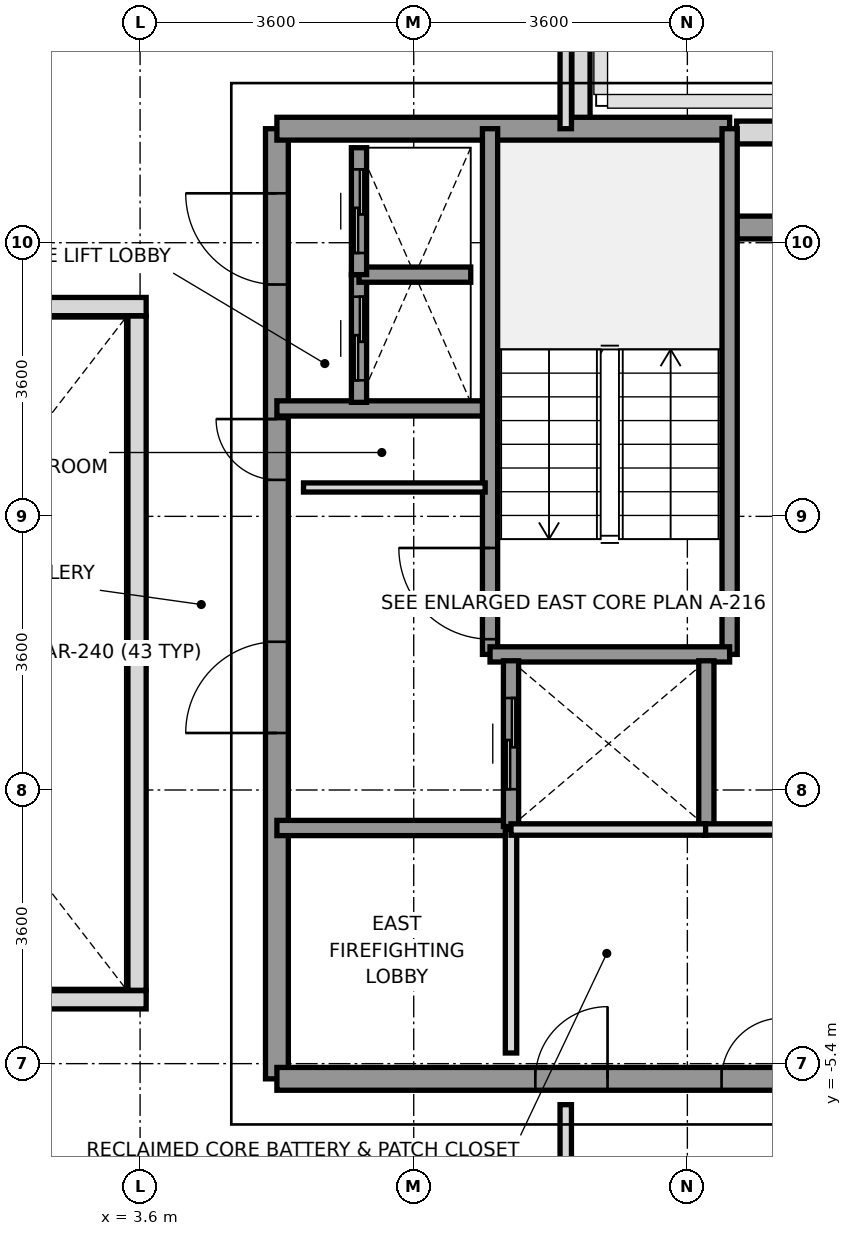
"""IFC4 building model, lengths in metres.
Left out: names, types, materials, properties, quantities, classifications, styles, units other than length and angle.
Written with IfcOpenShell. Run it as: python <this file> out.ifc"""

import sys

from ifc_helpers import new_model, si_unit, direction, frame, frame_2d, origin, place, context, subcontext, project, spatial, rectangle, extrude, source, transform, mapped, element, fill, save


model = new_model("IFC4")
c1 = context("Model", 3, precision=1e-05, world=origin(), true_north=direction((0.0, 1.0)))
c2 = subcontext(c1, "Body", "Model", "MODEL_VIEW")
j1 = project(units=[si_unit("LENGTHUNIT", "METRE"), si_unit("PLANEANGLEUNIT", "RADIAN")], contexts=[c1])
p1 = place(None, origin())
s1 = spatial("IfcSite", under=j1, at=p1, CompositionType="ELEMENT")
p2 = place(p1, origin())
s2 = spatial("IfcBuilding", under=s1, at=p2, CompositionType="ELEMENT")
p3 = place(p2, frame((0.0, 0.0, 233.2)))
s3 = spatial("IfcBuildingStorey", under=s2, at=p3, CompositionType="ELEMENT", Elevation=233.2)
p4 = place(p3, frame((11.448, 6.85, 0.0), z_axis=(0.0, 0.0, 1.0), x_axis=(1.0, 0.0, 0.0)))
e1 = element("IfcWall", 1, at=p4, inside=s3, PredefinedType="SOLIDWALL", context=c2, shape_type="SweptSolid", body=[
    extrude(rectangle(XDim=2.685, YDim=0.3, at=frame_2d((1.343, 0.0))), origin(), (0.0, 0.0, 1.0), 2.57),
])
p5 = place(p3, frame((9.4, 8.622, 0.0), z_axis=(0.0, 0.0, 1.0), x_axis=(0.0, -1.0, 0.0)))
e2 = element("IfcWall", 2, at=p5, inside=s3, PredefinedType="PARAPET", context=c2, shape_type="SweptSolid", body=[
    extrude(rectangle(XDim=1.669, YDim=0.24, at=frame_2d((0.834, 0.0))), origin(), (0.0, 0.0, 1.0), 1.15),
])
p6 = place(p3, frame((5.4, -5.6, 0.0), z_axis=(0.0, 0.0, 1.0), x_axis=(0.0, 1.0, 0.0)))
e3 = element("IfcWall", 3, at=p6, inside=s3, PredefinedType="SHEAR", context=c2, shape_type="SweptSolid", body=[
    extrude(rectangle(XDim=12.5, YDim=0.3, at=frame_2d((6.25, 0.0))), origin(), (0.0, 0.0, 1.0), 3.01),
])
p7 = place(p6, frame((4.55, 0.0, 0.0)))
e4 = element("IfcOpeningElement", 4, at=p7, cuts=e3, PredefinedType="OPENING", context=c2, shape_type="SweptSolid", body=[
    extrude(rectangle(XDim=1.2, YDim=2.2, at=frame_2d((0.6, 1.1))), frame((0.0, 0.16, 0.0), z_axis=(0.0, -1.0, 0.0), x_axis=(1.0, 0.0, 0.0)), (0.0, 0.0, 1.0), 0.32),
])
p8 = place(p6, frame((10.45, 0.0, 0.0)))
e5 = element("IfcOpeningElement", 5, at=p8, cuts=e3, PredefinedType="OPENING", context=c2, shape_type="SweptSolid", body=[
    extrude(rectangle(XDim=1.2, YDim=2.2, at=frame_2d((0.6, 1.1))), frame((0.0, 0.16, 0.0), z_axis=(0.0, -1.0, 0.0), x_axis=(1.0, 0.0, 0.0)), (0.0, 0.0, 1.0), 0.32),
])
p9 = place(p6, frame((7.88, 0.0, 0.0)))
e6 = element("IfcOpeningElement", 6, at=p9, cuts=e3, PredefinedType="OPENING", context=c2, shape_type="SweptSolid", body=[
    extrude(rectangle(XDim=0.8, YDim=2.1, at=frame_2d((0.4, 1.05))), frame((0.0, 0.16, 0.0), z_axis=(0.0, -1.0, 0.0), x_axis=(1.0, 0.0, 0.0)), (0.0, 0.0, 1.0), 0.32),
])
p10 = place(p3, frame((5.4, 6.9, 0.0), z_axis=(0.0, 0.0, 1.0), x_axis=(1.0, 0.0, 0.0)))
e7 = element("IfcWall", 7, at=p10, inside=s3, PredefinedType="SHEAR", context=c2, shape_type="SweptSolid", body=[
    extrude(rectangle(XDim=5.956, YDim=0.3, at=frame_2d((2.978, 0.0))), origin(), (0.0, 0.0, 1.0), 3.01),
])
p11 = place(p3, frame((11.356, 5.6, 0.0), z_axis=(0.0, 0.0, 1.0), x_axis=(1.0, 0.0, 0.0)))
e8 = element("IfcWall", 8, at=p11, inside=s3, PredefinedType="SHEAR", context=c2, shape_type="SweptSolid", body=[
    extrude(rectangle(XDim=1.844, YDim=0.3, at=frame_2d((0.922, 0.0))), origin(), (0.0, 0.0, 1.0), 3.01),
])
p12 = place(p3, frame((5.4, -5.6, 0.0), z_axis=(0.0, 0.0, 1.0), x_axis=(1.0, 0.0, 0.0)))
e9 = element("IfcWall", 9, at=p12, inside=s3, PredefinedType="SHEAR", context=c2, shape_type="SweptSolid", body=[
    extrude(rectangle(XDim=7.8, YDim=0.3, at=frame_2d((3.9, 0.0))), origin(), (0.0, 0.0, 1.0), 3.01),
])
p13 = place(p12, frame((5.85, 0.0, 0.0)))
e10 = element("IfcOpeningElement", 10, at=p13, cuts=e9, PredefinedType="OPENING", context=c2, shape_type="SweptSolid", body=[
    extrude(rectangle(XDim=0.8, YDim=2.1, at=frame_2d((0.4, 1.05))), frame((0.0, 0.16, 0.0), z_axis=(0.0, -1.0, 0.0), x_axis=(1.0, 0.0, 0.0)), (0.0, 0.0, 1.0), 0.32),
])
p14 = place(p12, frame((3.4, 0.0, 0.0)))
e11 = element("IfcOpeningElement", 11, at=p14, cuts=e9, PredefinedType="OPENING", context=c2, shape_type="SweptSolid", body=[
    extrude(rectangle(XDim=0.95, YDim=2.15, at=frame_2d((0.475, 1.075))), frame((0.0, 0.16, 0.0), z_axis=(0.0, -1.0, 0.0), x_axis=(1.0, 0.0, 0.0)), (0.0, 0.0, 1.0), 0.32),
])
p15 = place(p3, frame((5.4, 3.22, 0.0), z_axis=(0.0, 0.0, 1.0), x_axis=(1.0, 0.0, 0.0)))
e12 = element("IfcWall", 12, at=p15, inside=s3, PredefinedType="SOLIDWALL", context=c2, shape_type="SweptSolid", body=[
    extrude(rectangle(XDim=2.78, YDim=0.2, at=frame_2d((1.39, 0.0))), origin(), (0.0, 0.0, 1.0), 3.01),
])
p16 = place(p3, frame((5.4, -2.3, 0.0), z_axis=(0.0, 0.0, 1.0), x_axis=(1.0, 0.0, 0.0)))
e13 = element("IfcWall", 13, at=p16, inside=s3, PredefinedType="SOLIDWALL", context=c2, shape_type="SweptSolid", body=[
    extrude(rectangle(XDim=3.08, YDim=0.2, at=frame_2d((1.54, 0.0))), origin(), (0.0, 0.0, 1.0), 3.01),
])
p17 = place(p3, frame((8.204, -0.016, 0.0), z_axis=(0.0, 0.0, 1.0), x_axis=(0.0, 1.0, 0.0)))
e14 = element("IfcWall", 14, at=p17, inside=s3, PredefinedType="SOLIDWALL", context=c2, shape_type="SweptSolid", body=[
    extrude(rectangle(XDim=6.916, YDim=0.2, at=frame_2d((3.458, 0.0))), origin(), (0.0, 0.0, 1.0), 3.01),
])
p18 = place(p17, frame((0.2, 0.0, 0.0)))
e15 = element("IfcOpeningElement", 15, at=p18, cuts=e14, PredefinedType="OPENING", context=c2, shape_type="SweptSolid", body=[
    extrude(rectangle(XDim=1.2, YDim=2.2, at=frame_2d((0.6, 1.1))), frame((0.0, 0.11, 0.0), z_axis=(0.0, -1.0, 0.0), x_axis=(1.0, 0.0, 0.0)), (0.0, 0.0, 1.0), 0.22),
])
p19 = place(p3, frame((11.356, -0.016, 0.0), z_axis=(0.0, 0.0, 1.0), x_axis=(0.0, 1.0, 0.0)))
e16 = element("IfcWall", 16, at=p19, inside=s3, PredefinedType="SOLIDWALL", context=c2, shape_type="SweptSolid", body=[
    extrude(rectangle(XDim=6.916, YDim=0.2, at=frame_2d((3.458, 0.0))), origin(), (0.0, 0.0, 1.0), 3.01),
])
p20 = place(p3, frame((8.204, -0.016, 0.0), z_axis=(0.0, 0.0, 1.0), x_axis=(1.0, 0.0, 0.0)))
e17 = element("IfcWall", 17, at=p20, inside=s3, PredefinedType="SOLIDWALL", context=c2, shape_type="SweptSolid", body=[
    extrude(rectangle(XDim=3.152, YDim=0.2, at=frame_2d((1.576, 0.0))), origin(), (0.0, 0.0, 1.0), 3.01),
])
p21 = place(p3, frame((8.48, -2.28, 0.0), z_axis=(0.0, 0.0, 1.0), x_axis=(0.0, 1.0, 0.0)))
e18 = element("IfcWall", 18, at=p21, inside=s3, PredefinedType="SOLIDWALL", context=c2, shape_type="SweptSolid", body=[
    extrude(rectangle(XDim=2.18, YDim=0.2, at=frame_2d((1.09, 0.0))), origin(), (0.0, 0.0, 1.0), 3.01),
])
p22 = place(p21, frame((0.49, 0.0, 0.0)))
e19 = element("IfcOpeningElement", 19, at=p22, cuts=e18, PredefinedType="OPENING", context=c2, shape_type="SweptSolid", body=[
    extrude(rectangle(XDim=1.2, YDim=2.2, at=frame_2d((0.6, 1.1))), frame((0.0, 0.11, 0.0), z_axis=(0.0, -1.0, 0.0), x_axis=(1.0, 0.0, 0.0)), (0.0, 0.0, 1.0), 0.22),
])
p23 = place(p3, frame((11.05, -2.28, 0.0), z_axis=(0.0, 0.0, 1.0), x_axis=(0.0, 1.0, 0.0)))
e20 = element("IfcWall", 20, at=p23, inside=s3, PredefinedType="SOLIDWALL", context=c2, shape_type="SweptSolid", body=[
    extrude(rectangle(XDim=2.18, YDim=0.2, at=frame_2d((1.09, 0.0))), origin(), (0.0, 0.0, 1.0), 3.01),
])
p24 = place(p3, frame((6.48, 3.3, 0.0), z_axis=(0.0, 0.0, 1.0), x_axis=(0.0, 1.0, 0.0)))
e21 = element("IfcWall", 21, at=p24, inside=s3, PredefinedType="SOLIDWALL", context=c2, shape_type="SweptSolid", body=[
    extrude(rectangle(XDim=1.68, YDim=0.2, at=frame_2d((0.84, 0.0))), origin(), (0.0, 0.0, 1.0), 3.01),
])
p25 = place(p24, frame((0.29, 0.0, 0.0)))
e22 = element("IfcOpeningElement", 22, at=p25, cuts=e21, PredefinedType="OPENING", context=c2, shape_type="SweptSolid", body=[
    extrude(rectangle(XDim=1.1, YDim=2.2, at=frame_2d((0.55, 1.1))), frame((0.0, 0.11, 0.0), z_axis=(0.0, -1.0, 0.0), x_axis=(1.0, 0.0, 0.0)), (0.0, 0.0, 1.0), 0.22),
])
p26 = place(p3, frame((6.48, 4.98, 0.0), z_axis=(0.0, 0.0, 1.0), x_axis=(1.0, 0.0, 0.0)))
e23 = element("IfcWall", 23, at=p26, inside=s3, PredefinedType="SOLIDWALL", context=c2, shape_type="SweptSolid", body=[
    extrude(rectangle(XDim=1.47, YDim=0.2, at=frame_2d((0.735, 0.0))), origin(), (0.0, 0.0, 1.0), 3.01),
])
p27 = place(p3, frame((6.48, 4.98, 0.0), z_axis=(0.0, 0.0, 1.0), x_axis=(0.0, 1.0, 0.0)))
e24 = element("IfcWall", 24, at=p27, inside=s3, PredefinedType="SOLIDWALL", context=c2, shape_type="SweptSolid", body=[
    extrude(rectangle(XDim=1.67, YDim=0.2, at=frame_2d((0.835, 0.0))), origin(), (0.0, 0.0, 1.0), 3.01),
])
p28 = place(p27, frame((0.285, 0.0, 0.0)))
e25 = element("IfcOpeningElement", 25, at=p28, cuts=e24, PredefinedType="OPENING", context=c2, shape_type="SweptSolid", body=[
    extrude(rectangle(XDim=1.1, YDim=2.2, at=frame_2d((0.55, 1.1))), frame((0.0, 0.11, 0.0), z_axis=(0.0, -1.0, 0.0), x_axis=(1.0, 0.0, 0.0)), (0.0, 0.0, 1.0), 0.22),
])
p29 = place(p3, frame((5.75, 2.18, 0.0), z_axis=(0.0, 0.0, 1.0), x_axis=(1.0, 0.0, 0.0)))
e26 = element("IfcWall", 26, at=p29, inside=s3, PredefinedType="PARTITIONING", context=c2, shape_type="SweptSolid", body=[
    extrude(rectangle(XDim=2.39, YDim=0.12, at=frame_2d((1.195, 0.0))), origin(), (0.0, 0.0, 1.0), 3.01),
])
p30 = place(p3, frame((11.02, -2.32, 0.0), z_axis=(0.0, 0.0, 1.0), x_axis=(1.0, 0.0, 0.0)))
e27 = element("IfcWall", 27, at=p30, inside=s3, PredefinedType="PARTITIONING", context=c2, shape_type="SweptSolid", body=[
    extrude(rectangle(XDim=2.18, YDim=0.15, at=frame_2d((1.09, 0.0))), origin(), (0.0, 0.0, 1.0), 3.01),
])
p31 = place(p3, frame((8.48, -5.26, 0.0), z_axis=(0.0, 0.0, 1.0), x_axis=(0.0, 1.0, 0.0)))
e28 = element("IfcWall", 28, at=p31, inside=s3, PredefinedType="PARTITIONING", context=c2, shape_type="SweptSolid", body=[
    extrude(rectangle(XDim=2.94, YDim=0.15, at=frame_2d((1.47, 0.0))), origin(), (0.0, 0.0, 1.0), 3.01),
])
p32 = place(p3, frame((8.48, -2.32, 0.0), z_axis=(0.0, 0.0, 1.0), x_axis=(1.0, 0.0, 0.0)))
e29 = element("IfcWall", 29, at=p32, inside=s3, PredefinedType="PARTITIONING", context=c2, shape_type="SweptSolid", body=[
    extrude(rectangle(XDim=2.56, YDim=0.15, at=frame_2d((1.28, 0.0))), origin(), (0.0, 0.0, 1.0), 3.01),
])
p33 = place(p3, frame((9.2, 6.9, 0.0), z_axis=(0.0, 0.0, 1.0), x_axis=(0.0, 1.0, 0.0)))
e30 = element("IfcWall", 30, at=p33, inside=s3, PredefinedType="PARTITIONING", context=c2, shape_type="SweptSolid", body=[
    extrude(rectangle(XDim=3.38, YDim=0.15, at=frame_2d((1.69, 0.0))), origin(), (0.0, 0.0, 1.0), 2.61),
])
p34 = place(p3, frame((9.2, -10.28, 0.0), z_axis=(0.0, 0.0, 1.0), x_axis=(0.0, 1.0, 0.0)))
e31 = element("IfcWall", 31, at=p34, inside=s3, PredefinedType="PARTITIONING", context=c2, shape_type="SweptSolid", body=[
    extrude(rectangle(XDim=4.34, YDim=0.15, at=frame_2d((2.17, 0.0))), origin(), (0.0, 0.0, 1.0), 2.61),
])
for number, where, z_axis, x_axis in (
    (32, (-3.68, -4.56, 0.0), (0.0, 0.0, 1.0), (1.0, 0.0, 0.0)),
    (33, (-3.68, 4.56, 0.0), (0.0, 0.0, 1.0), (1.0, 0.0, 0.0)),
):
    element("IfcWall", number, at=place(p3, frame(where, z_axis=z_axis, x_axis=x_axis)), inside=s3, PredefinedType="PARAPET", context=c2, shape_type="SweptSolid", body=[
        extrude(rectangle(XDim=7.36, YDim=0.24, at=frame_2d((3.68, 0.0))), origin(), (0.0, 0.0, 1.0), 1.15),
    ])
p35 = place(p3, frame((3.56, -4.435, 0.0), z_axis=(0.0, 0.0, 1.0), x_axis=(0.0, 1.0, 0.0)))
e34 = element("IfcWall", 34, at=p35, inside=s3, PredefinedType="PARAPET", context=c2, shape_type="SweptSolid", body=[
    extrude(rectangle(XDim=8.87, YDim=0.24, at=frame_2d((4.435, 0.0))), origin(), (0.0, 0.0, 1.0), 1.15),
])
m1 = source(origin(), c2, "Body", "SweptSolid", [
    extrude(rectangle(XDim=1.2, YDim=2.2, at=frame_2d((0.6, 1.1))), frame((0.0, 0.025, 0.0), z_axis=(0.0, -1.0, 0.0), x_axis=(1.0, 0.0, 0.0)), (0.0, 0.0, 1.0), 0.05),
])
p36 = place(p18, origin())
e35 = element("IfcDoor", 35, at=p36, inside=s3, OperationType="SINGLE_SWING_RIGHT", PredefinedType="DOOR", context=c2, shape_type="MappedRepresentation", body=[
    mapped(m1, transform((0.0, 0.0, 0.0), x_axis=(1.0, 0.0, 0.0), y_axis=(0.0, 1.0, 0.0), z_axis=(0.0, 0.0, 1.0), scale=1.0)),
])
fill(e15, e35)
p37 = place(p7, origin())
e36 = element("IfcDoor", 36, at=p37, inside=s3, OperationType="SINGLE_SWING_LEFT", PredefinedType="DOOR", context=c2, shape_type="MappedRepresentation", body=[
    mapped(m1, transform((0.0, 0.0, 0.0), x_axis=(1.0, 0.0, 0.0), y_axis=(0.0, 1.0, 0.0), z_axis=(0.0, 0.0, 1.0), scale=1.0)),
])
fill(e4, e36)
p38 = place(p8, origin())
e37 = element("IfcDoor", 37, at=p38, inside=s3, OperationType="SINGLE_SWING_RIGHT", PredefinedType="DOOR", context=c2, shape_type="MappedRepresentation", body=[
    mapped(m1, transform((0.0, 0.0, 0.0), x_axis=(1.0, 0.0, 0.0), y_axis=(0.0, 1.0, 0.0), z_axis=(0.0, 0.0, 1.0), scale=1.0)),
])
fill(e5, e37)
m2 = source(origin(), c2, "Body", "SweptSolid", [
    extrude(rectangle(XDim=0.8, YDim=2.1, at=frame_2d((0.4, 1.05))), frame((0.0, 0.025, 0.0), z_axis=(0.0, -1.0, 0.0), x_axis=(1.0, 0.0, 0.0)), (0.0, 0.0, 1.0), 0.05),
])
p39 = place(p9, origin())
e38 = element("IfcDoor", 38, at=p39, inside=s3, OperationType="SINGLE_SWING_RIGHT", PredefinedType="DOOR", context=c2, shape_type="MappedRepresentation", body=[
    mapped(m2, transform((0.0, 0.0, 0.0), x_axis=(1.0, 0.0, 0.0), y_axis=(0.0, 1.0, 0.0), z_axis=(0.0, 0.0, 1.0), scale=1.0)),
])
fill(e6, e38)
p40 = place(p13, origin())
e39 = element("IfcDoor", 39, at=p40, inside=s3, OperationType="SINGLE_SWING_RIGHT", PredefinedType="DOOR", context=c2, shape_type="MappedRepresentation", body=[
    mapped(m2, transform((0.0, 0.0, 0.0), x_axis=(1.0, 0.0, 0.0), y_axis=(0.0, 1.0, 0.0), z_axis=(0.0, 0.0, 1.0), scale=1.0)),
])
fill(e10, e39)
m3 = source(origin(), c2, "Body", "SweptSolid", [
    extrude(rectangle(XDim=0.95, YDim=2.15, at=frame_2d((0.475, 1.075))), frame((0.0, 0.025, 0.0), z_axis=(0.0, -1.0, 0.0), x_axis=(1.0, 0.0, 0.0)), (0.0, 0.0, 1.0), 0.05),
])
p41 = place(p14, origin())
e40 = element("IfcDoor", 40, at=p41, inside=s3, OperationType="SINGLE_SWING_RIGHT", PredefinedType="DOOR", context=c2, shape_type="MappedRepresentation", body=[
    mapped(m3, transform((0.0, 0.0, 0.0), x_axis=(1.0, 0.0, 0.0), y_axis=(0.0, 1.0, 0.0), z_axis=(0.0, 0.0, 1.0), scale=1.0)),
])
fill(e11, e40)
p42 = place(p22, origin())
e41 = element("IfcDoor", 41, at=p42, inside=s3, OperationType="SLIDING_TO_RIGHT", PredefinedType="DOOR", context=c2, shape_type="MappedRepresentation", body=[
    mapped(m1, transform((0.0, 0.0, 0.0), x_axis=(1.0, 0.0, 0.0), y_axis=(0.0, 1.0, 0.0), z_axis=(0.0, 0.0, 1.0), scale=1.0)),
])
fill(e19, e41)
m4 = source(origin(), c2, "Body", "SweptSolid", [
    extrude(rectangle(XDim=1.1, YDim=2.2, at=frame_2d((0.55, 1.1))), frame((0.0, 0.025, 0.0), z_axis=(0.0, -1.0, 0.0), x_axis=(1.0, 0.0, 0.0)), (0.0, 0.0, 1.0), 0.05),
])
p43 = place(p25, origin())
e42 = element("IfcDoor", 42, at=p43, inside=s3, OperationType="SLIDING_TO_LEFT", PredefinedType="DOOR", context=c2, shape_type="MappedRepresentation", body=[
    mapped(m4, transform((0.0, 0.0, 0.0), x_axis=(1.0, 0.0, 0.0), y_axis=(0.0, 1.0, 0.0), z_axis=(0.0, 0.0, 1.0), scale=1.0)),
])
fill(e22, e42)
p44 = place(p28, origin())
e43 = element("IfcDoor", 43, at=p44, inside=s3, OperationType="SLIDING_TO_LEFT", PredefinedType="DOOR", context=c2, shape_type="MappedRepresentation", body=[
    mapped(m4, transform((0.0, 0.0, 0.0), x_axis=(1.0, 0.0, 0.0), y_axis=(0.0, 1.0, 0.0), z_axis=(0.0, 0.0, 1.0), scale=1.0)),
])
fill(e25, e43)
save(model, sys.argv[1])
